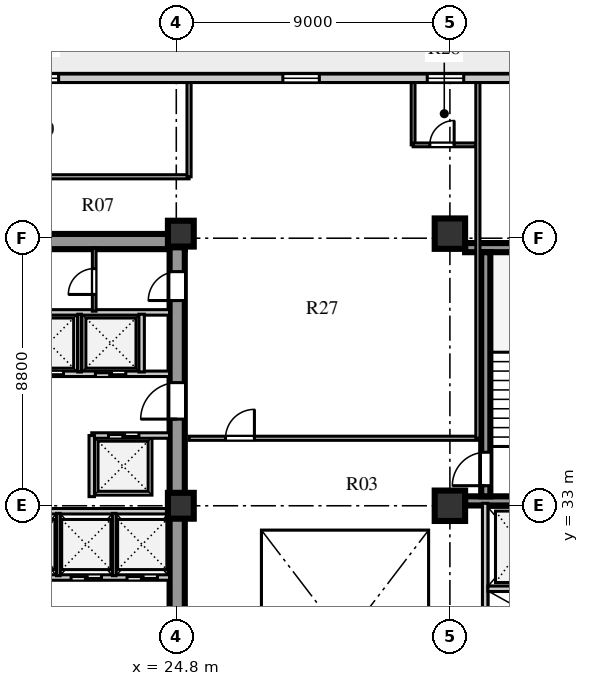
"""IFC4 building model, lengths in metres.
Left out: names, types, materials, properties, quantities, classifications, styles, units other than length and angle.
Written with IfcOpenShell. Run it as: python <this file> out.ifc"""

import sys

from ifc_helpers import new_model, si_unit, direction, frame, frame_2d, origin, origin_2d, place, context, subcontext, project, spatial, rectangle, extrude, element, fill, save


model = new_model("IFC4")
c1 = context("Model", 3, precision=1e-05, world=origin(), true_north=direction((0.0, 1.0)))
c2 = subcontext(c1, "Body", "Model", "MODEL_VIEW")
j1 = project(units=[si_unit("LENGTHUNIT", "METRE"), si_unit("PLANEANGLEUNIT", "RADIAN")], contexts=[c1])
p1 = place(None, origin())
s1 = spatial("IfcSite", under=j1, at=p1, CompositionType="ELEMENT")
p2 = place(p1, origin())
s2 = spatial("IfcBuilding", under=s1, at=p2, CompositionType="ELEMENT")
p3 = place(p2, frame((0.0, 0.0, 119.4)))
s3 = spatial("IfcBuildingStorey", under=s2, at=p3, CompositionType="ELEMENT", Elevation=119.4)
p4 = place(p3, frame((15.4, 41.69, 0.0), z_axis=(0.0, 0.0, 1.0), x_axis=(1.0, 0.0, 0.0)))
e1 = element("IfcWall", 1, at=p4, inside=s3, PredefinedType="SHEAR", context=c2, shape_type="SweptSolid", body=[
    extrude(rectangle(XDim=9.68, YDim=0.5, at=frame_2d((4.84, 0.0))), origin(), (0.0, 0.0, 1.0), 3.6),
])
p5 = place(p3, frame((24.83, 15.74, 0.0), z_axis=(0.0, 0.0, 1.0), x_axis=(0.0, 1.0, 0.0)))
e2 = element("IfcWall", 2, at=p5, inside=s3, PredefinedType="SHEAR", context=c2, shape_type="SweptSolid", body=[
    extrude(rectangle(XDim=25.76, YDim=0.5, at=frame_2d((12.88, 0.0))), origin(), (0.0, 0.0, 1.0), 3.6),
])
p6 = place(p5, frame((1.61, 0.0, 0.0)))
e3 = element("IfcOpeningElement", 3, at=p6, cuts=e2, PredefinedType="OPENING", context=c2, shape_type="SweptSolid", body=[
    extrude(rectangle(XDim=1.2, YDim=2.1, at=frame_2d((0.6, 1.05))), frame((0.0, 0.26, 0.0), z_axis=(0.0, -1.0, 0.0), x_axis=(1.0, 0.0, 0.0)), (0.0, 0.0, 1.0), 0.52),
])
p7 = place(p5, frame((6.78, 0.0, 0.0)))
e4 = element("IfcOpeningElement", 4, at=p7, cuts=e2, PredefinedType="OPENING", context=c2, shape_type="SweptSolid", body=[
    extrude(rectangle(XDim=0.85, YDim=2.06, at=frame_2d((0.425, 1.03))), frame((0.0, 0.26, 0.0), z_axis=(0.0, -1.0, 0.0), x_axis=(1.0, 0.0, 0.0)), (0.0, 0.0, 1.0), 0.52),
])
p8 = place(p5, frame((12.11, 0.0, 0.0)))
e5 = element("IfcOpeningElement", 5, at=p8, cuts=e2, PredefinedType="OPENING", context=c2, shape_type="SweptSolid", body=[
    extrude(rectangle(XDim=1.5, YDim=2.12, at=frame_2d((0.75, 1.06))), frame((0.0, 0.26, 0.0), z_axis=(0.0, -1.0, 0.0), x_axis=(1.0, 0.0, 0.0)), (0.0, 0.0, 1.0), 0.52),
])
p9 = place(p5, frame((20.11, 0.0, 0.0)))
e6 = element("IfcOpeningElement", 6, at=p9, cuts=e2, PredefinedType="OPENING", context=c2, shape_type="SweptSolid", body=[
    extrude(rectangle(XDim=1.2, YDim=2.12, at=frame_2d((0.6, 1.06))), frame((0.0, 0.26, 0.0), z_axis=(0.0, -1.0, 0.0), x_axis=(1.0, 0.0, 0.0)), (0.0, 0.0, 1.0), 0.52),
])
p10 = place(p5, frame((24.01, 0.0, 0.0)))
e7 = element("IfcOpeningElement", 7, at=p10, cuts=e2, PredefinedType="OPENING", context=c2, shape_type="SweptSolid", body=[
    extrude(rectangle(XDim=0.95, YDim=2.1, at=frame_2d((0.475, 1.05))), frame((0.0, 0.26, 0.0), z_axis=(0.0, -1.0, 0.0), x_axis=(1.0, 0.0, 0.0)), (0.0, 0.0, 1.0), 0.52),
])
for number, where, z_axis, x_axis in (
    (8, (34.3, 33.16, 0.0), (0.0, 0.0, 1.0), (1.0, 0.0, 0.0)),
    (9, (34.3, 41.49, 0.0), (0.0, 0.0, 1.0), (1.0, 0.0, 0.0)),
):
    element("IfcWall", number, at=place(p3, frame(where, z_axis=z_axis, x_axis=x_axis)), inside=s3, PredefinedType="SHEAR", context=c2, shape_type="SweptSolid", body=[
        extrude(rectangle(XDim=4.57, YDim=0.3, at=frame_2d((2.285, 0.0))), origin(), (0.0, 0.0, 1.0), 3.6),
    ])
p11 = place(p3, frame((34.98, 33.31, 0.0), z_axis=(0.0, 0.0, 1.0), x_axis=(0.0, 1.0, 0.0)))
e10 = element("IfcWall", 10, at=p11, inside=s3, PredefinedType="SHEAR", context=c2, shape_type="SweptSolid", body=[
    extrude(rectangle(XDim=8.03, YDim=0.3, at=frame_2d((4.015, 0.0))), origin(), (0.0, 0.0, 1.0), 3.6),
])
p12 = place(p11, frame((0.35, 0.0, 0.0)))
e11 = element("IfcOpeningElement", 11, at=p12, cuts=e10, PredefinedType="OPENING", context=c2, shape_type="SweptSolid", body=[
    extrude(rectangle(XDim=1.1, YDim=2.1, at=frame_2d((0.55, 1.05))), frame((0.0, 0.16, 0.0), z_axis=(0.0, -1.0, 0.0), x_axis=(1.0, 0.0, 0.0)), (0.0, 0.0, 1.0), 0.32),
])
for number, where, z_axis, x_axis in (
    (12, (24.95, 33.0, 0.0), (0.0, 0.0, 1.0), (1.0, 0.0, 0.0)),
    (13, (24.95, 41.95, 0.0), (0.0, 0.0, 1.0), (1.0, 0.0, 0.0)),
):
    element("IfcColumn", number, at=place(p3, frame(where, z_axis=z_axis, x_axis=x_axis)), inside=s3, PredefinedType="COLUMN", context=c2, shape_type="SweptSolid", body=[
        extrude(rectangle(XDim=0.85, YDim=0.85, at=origin_2d()), origin(), (0.0, 0.0, 1.0), 3.6),
    ])
for number, where, z_axis, x_axis in (
    (14, (33.8, 33.0, 0.0), (0.0, 0.0, 1.0), (1.0, 0.0, 0.0)),
    (15, (33.8, 41.95, 0.0), (0.0, 0.0, 1.0), (1.0, 0.0, 0.0)),
):
    element("IfcColumn", number, at=place(p3, frame(where, z_axis=z_axis, x_axis=x_axis)), inside=s3, PredefinedType="COLUMN", context=c2, shape_type="SweptSolid", body=[
        extrude(rectangle(XDim=1.0, YDim=1.0, at=origin_2d()), origin(), (0.0, 0.0, 1.0), 3.6),
    ])
p13 = place(p3, frame((45.35, 47.06, 0.0), z_axis=(0.0, 0.0, 1.0), x_axis=(-1.0, 0.0, 0.0)))
e16 = element("IfcWall", 16, at=p13, inside=s3, PredefinedType="STANDARD", context=c2, shape_type="SweptSolid", body=[
    extrude(rectangle(XDim=32.1, YDim=0.28, at=frame_2d((16.05, 0.0))), origin(), (0.0, 0.0, 1.0), 3.6),
])
p14 = place(p13, frame((30.15, 0.0, 0.0)))
e17 = element("IfcOpeningElement", 17, at=p14, cuts=e16, PredefinedType="OPENING", context=c2, shape_type="SweptSolid", body=[
    extrude(rectangle(XDim=1.0, YDim=2.05, at=frame_2d((0.5, 1.025))), frame((0.0, 0.15, 0.0), z_axis=(0.0, -1.0, 0.0), x_axis=(1.0, 0.0, 0.0)), (0.0, 0.0, 1.0), 0.3),
])
p15 = place(p13, frame((24.42, 0.0, 0.8)))
e18 = element("IfcOpeningElement", 18, at=p15, cuts=e16, PredefinedType="OPENING", context=c2, shape_type="SweptSolid", body=[
    extrude(rectangle(XDim=1.5, YDim=2.0, at=frame_2d((0.75, 1.0))), frame((0.0, 0.15, 0.0), z_axis=(0.0, -1.0, 0.0), x_axis=(1.0, 0.0, 0.0)), (0.0, 0.0, 1.0), 0.3),
])
p16 = place(p13, frame((15.845, 0.0, 0.8)))
e19 = element("IfcOpeningElement", 19, at=p16, cuts=e16, PredefinedType="OPENING", context=c2, shape_type="SweptSolid", body=[
    extrude(rectangle(XDim=1.2, YDim=1.75, at=frame_2d((0.6, 0.875))), frame((0.0, 0.15, 0.0), z_axis=(0.0, -1.0, 0.0), x_axis=(1.0, 0.0, 0.0)), (0.0, 0.0, 1.0), 0.3),
])
p17 = place(p13, frame((11.095, 0.0, 0.8)))
e20 = element("IfcOpeningElement", 20, at=p17, cuts=e16, PredefinedType="OPENING", context=c2, shape_type="SweptSolid", body=[
    extrude(rectangle(XDim=1.2, YDim=1.75, at=frame_2d((0.6, 0.875))), frame((0.0, 0.15, 0.0), z_axis=(0.0, -1.0, 0.0), x_axis=(1.0, 0.0, 0.0)), (0.0, 0.0, 1.0), 0.3),
])
p18 = place(p13, frame((6.53, 0.0, 0.8)))
e21 = element("IfcOpeningElement", 21, at=p18, cuts=e16, PredefinedType="OPENING", context=c2, shape_type="SweptSolid", body=[
    extrude(rectangle(XDim=2.1, YDim=1.95, at=frame_2d((1.05, 0.975))), frame((0.0, 0.15, 0.0), z_axis=(0.0, -1.0, 0.0), x_axis=(1.0, 0.0, 0.0)), (0.0, 0.0, 1.0), 0.3),
])
p19 = place(p13, frame((1.645, 0.0, 0.8)))
e22 = element("IfcOpeningElement", 22, at=p19, cuts=e16, PredefinedType="OPENING", context=c2, shape_type="SweptSolid", body=[
    extrude(rectangle(XDim=1.35, YDim=1.9, at=frame_2d((0.675, 0.95))), frame((0.0, 0.15, 0.0), z_axis=(0.0, -1.0, 0.0), x_axis=(1.0, 0.0, 0.0)), (0.0, 0.0, 1.0), 0.3),
])
p20 = place(p3, frame((15.9, 30.64, 0.0), z_axis=(0.0, 0.0, 1.0), x_axis=(1.0, 0.0, 0.0)))
e23 = element("IfcWall", 23, at=p20, inside=s3, PredefinedType="SOLIDWALL", context=c2, shape_type="SweptSolid", body=[
    extrude(rectangle(XDim=8.68, YDim=0.18, at=frame_2d((4.34, 0.0))), origin(), (0.0, 0.0, 1.0), 3.6),
])
p21 = place(p20, frame((1.76, 0.0, 0.0)))
e24 = element("IfcOpeningElement", 24, at=p21, cuts=e23, PredefinedType="OPENING", context=c2, shape_type="SweptSolid", body=[
    extrude(rectangle(XDim=1.0, YDim=2.1, at=frame_2d((0.5, 1.05))), frame((0.0, 0.1, 0.0), z_axis=(0.0, -1.0, 0.0), x_axis=(1.0, 0.0, 0.0)), (0.0, 0.0, 1.0), 0.2),
])
p22 = place(p20, frame((3.6, 0.0, 0.0)))
e25 = element("IfcOpeningElement", 25, at=p22, cuts=e23, PredefinedType="OPENING", context=c2, shape_type="SweptSolid", body=[
    extrude(rectangle(XDim=1.0, YDim=2.1, at=frame_2d((0.5, 1.05))), frame((0.0, 0.1, 0.0), z_axis=(0.0, -1.0, 0.0), x_axis=(1.0, 0.0, 0.0)), (0.0, 0.0, 1.0), 0.2),
])
p23 = place(p20, frame((5.44, 0.0, 0.0)))
e26 = element("IfcOpeningElement", 26, at=p23, cuts=e23, PredefinedType="OPENING", context=c2, shape_type="SweptSolid", body=[
    extrude(rectangle(XDim=1.0, YDim=2.1, at=frame_2d((0.5, 1.05))), frame((0.0, 0.1, 0.0), z_axis=(0.0, -1.0, 0.0), x_axis=(1.0, 0.0, 0.0)), (0.0, 0.0, 1.0), 0.2),
])
p24 = place(p20, frame((7.28, 0.0, 0.0)))
e27 = element("IfcOpeningElement", 27, at=p24, cuts=e23, PredefinedType="OPENING", context=c2, shape_type="SweptSolid", body=[
    extrude(rectangle(XDim=1.0, YDim=2.1, at=frame_2d((0.5, 1.05))), frame((0.0, 0.1, 0.0), z_axis=(0.0, -1.0, 0.0), x_axis=(1.0, 0.0, 0.0)), (0.0, 0.0, 1.0), 0.2),
])
p25 = place(p3, frame((15.9, 32.82, 0.0), z_axis=(0.0, 0.0, 1.0), x_axis=(1.0, 0.0, 0.0)))
e28 = element("IfcWall", 28, at=p25, inside=s3, PredefinedType="SOLIDWALL", context=c2, shape_type="SweptSolid", body=[
    extrude(rectangle(XDim=8.68, YDim=0.18, at=frame_2d((4.34, 0.0))), origin(), (0.0, 0.0, 1.0), 2.95),
])
for number, where, z_axis, x_axis in (
    (29, (20.92, 30.7, 0.0), (0.0, 0.0, 1.0), (0.0, 1.0, 0.0)),
    (30, (22.76, 30.7, 0.0), (0.0, 0.0, 1.0), (0.0, 1.0, 0.0)),
):
    element("IfcWall", number, at=place(p3, frame(where, z_axis=z_axis, x_axis=x_axis)), inside=s3, PredefinedType="PARTITIONING", context=c2, shape_type="SweptSolid", body=[
        extrude(rectangle(XDim=2.05, YDim=0.12, at=frame_2d((1.025, 0.0))), origin(), (0.0, 0.0, 1.0), 3.6),
    ])
p26 = place(p3, frame((22.02, 35.31, 0.0), z_axis=(0.0, 0.0, 1.0), x_axis=(1.0, 0.0, 0.0)))
e31 = element("IfcWall", 31, at=p26, inside=s3, PredefinedType="SOLIDWALL", context=c2, shape_type="SweptSolid", body=[
    extrude(rectangle(XDim=2.56, YDim=0.18, at=frame_2d((1.28, 0.0))), origin(), (0.0, 0.0, 1.0), 3.6),
])
p27 = place(p26, frame((0.55, 0.0, 0.0)))
e32 = element("IfcOpeningElement", 32, at=p27, cuts=e31, PredefinedType="OPENING", context=c2, shape_type="SweptSolid", body=[
    extrude(rectangle(XDim=1.0, YDim=2.1, at=frame_2d((0.5, 1.05))), frame((0.0, 0.1, 0.0), z_axis=(0.0, -1.0, 0.0), x_axis=(1.0, 0.0, 0.0)), (0.0, 0.0, 1.0), 0.2),
])
p28 = place(p3, frame((22.02, 33.3, 0.0), z_axis=(0.0, 0.0, 1.0), x_axis=(0.0, 1.0, 0.0)))
e33 = element("IfcWall", 33, at=p28, inside=s3, PredefinedType="SOLIDWALL", context=c2, shape_type="SweptSolid", body=[
    extrude(rectangle(XDim=2.01, YDim=0.18, at=frame_2d((1.005, 0.0))), origin(), (0.0, 0.0, 1.0), 3.6),
])
p29 = place(p3, frame((19.64, 37.34, 0.0), z_axis=(0.0, 0.0, 1.0), x_axis=(1.0, 0.0, 0.0)))
e34 = element("IfcWall", 34, at=p29, inside=s3, PredefinedType="SOLIDWALL", context=c2, shape_type="SweptSolid", body=[
    extrude(rectangle(XDim=4.94, YDim=0.18, at=frame_2d((2.47, 0.0))), origin(), (0.0, 0.0, 1.0), 3.6),
])
p30 = place(p29, frame((0.45, 0.0, 0.0)))
e35 = element("IfcOpeningElement", 35, at=p30, cuts=e34, PredefinedType="OPENING", context=c2, shape_type="SweptSolid", body=[
    extrude(rectangle(XDim=1.0, YDim=2.1, at=frame_2d((0.5, 1.05))), frame((0.0, 0.1, 0.0), z_axis=(0.0, -1.0, 0.0), x_axis=(1.0, 0.0, 0.0)), (0.0, 0.0, 1.0), 0.2),
])
p31 = place(p29, frame((2.5, 0.0, 0.0)))
e36 = element("IfcOpeningElement", 36, at=p31, cuts=e34, PredefinedType="OPENING", context=c2, shape_type="SweptSolid", body=[
    extrude(rectangle(XDim=1.0, YDim=2.1, at=frame_2d((0.5, 1.05))), frame((0.0, 0.1, 0.0), z_axis=(0.0, -1.0, 0.0), x_axis=(1.0, 0.0, 0.0)), (0.0, 0.0, 1.0), 0.2),
])
p32 = place(p3, frame((19.64, 39.36, 0.0), z_axis=(0.0, 0.0, 1.0), x_axis=(1.0, 0.0, 0.0)))
e37 = element("IfcWall", 37, at=p32, inside=s3, PredefinedType="SOLIDWALL", context=c2, shape_type="SweptSolid", body=[
    extrude(rectangle(XDim=4.94, YDim=0.18, at=frame_2d((2.47, 0.0))), origin(), (0.0, 0.0, 1.0), 3.6),
])
p33 = place(p3, frame((21.62, 37.4, 0.0), z_axis=(0.0, 0.0, 1.0), x_axis=(0.0, 1.0, 0.0)))
e38 = element("IfcWall", 38, at=p33, inside=s3, PredefinedType="PARTITIONING", context=c2, shape_type="SweptSolid", body=[
    extrude(rectangle(XDim=1.9, YDim=0.12, at=frame_2d((0.95, 0.0))), origin(), (0.0, 0.0, 1.0), 3.6),
])
p34 = place(p3, frame((23.66, 37.4, 0.0), z_axis=(0.0, 0.0, 1.0), x_axis=(0.0, 1.0, 0.0)))
e39 = element("IfcWall", 39, at=p34, inside=s3, PredefinedType="SOLIDWALL", context=c2, shape_type="SweptSolid", body=[
    extrude(rectangle(XDim=1.9, YDim=0.18, at=frame_2d((0.95, 0.0))), origin(), (0.0, 0.0, 1.0), 3.6),
])
p35 = place(p3, frame((22.1, 39.4, 0.0), z_axis=(0.0, 0.0, 1.0), x_axis=(0.0, 1.0, 0.0)))
e40 = element("IfcWall", 40, at=p35, inside=s3, PredefinedType="PARTITIONING", context=c2, shape_type="SweptSolid", body=[
    extrude(rectangle(XDim=2.08, YDim=0.12, at=frame_2d((1.04, 0.0))), origin(), (0.0, 0.0, 1.0), 3.6),
])
p36 = place(p35, frame((0.55, 0.0, 0.0)))
e41 = element("IfcOpeningElement", 41, at=p36, cuts=e40, PredefinedType="OPENING", context=c2, shape_type="SweptSolid", body=[
    extrude(rectangle(XDim=0.85, YDim=2.06, at=frame_2d((0.425, 1.03))), frame((0.0, 0.07, 0.0), z_axis=(0.0, -1.0, 0.0), x_axis=(1.0, 0.0, 0.0)), (0.0, 0.0, 1.0), 0.14),
])
p37 = place(p3, frame((34.96, 28.86, 0.0), z_axis=(0.0, 0.0, 1.0), x_axis=(0.0, 1.0, 0.0)))
e42 = element("IfcWall", 42, at=p37, inside=s3, PredefinedType="SOLIDWALL", context=c2, shape_type="SweptSolid", body=[
    extrude(rectangle(XDim=4.22, YDim=0.18, at=frame_2d((2.11, 0.0))), origin(), (0.0, 0.0, 1.0), 3.6),
])
p38 = place(p3, frame((35.05, 30.27, 0.0), z_axis=(0.0, 0.0, 1.0), x_axis=(1.0, 0.0, 0.0)))
e43 = element("IfcWall", 43, at=p38, inside=s3, PredefinedType="SOLIDWALL", context=c2, shape_type="SweptSolid", body=[
    extrude(rectangle(XDim=2.25, YDim=0.18, at=frame_2d((1.125, 0.0))), origin(), (0.0, 0.0, 1.0), 3.6),
])
p39 = place(p3, frame((25.22, 35.22, 0.0), z_axis=(0.0, 0.0, 1.0), x_axis=(1.0, 0.0, 0.0)))
e44 = element("IfcWall", 44, at=p39, inside=s3, PredefinedType="PARTITIONING", context=c2, shape_type="SweptSolid", body=[
    extrude(rectangle(XDim=9.5, YDim=0.135, at=frame_2d((4.75, 0.0))), origin(), (0.0, 0.0, 1.0), 3.6),
])
p40 = place(p39, frame((1.2, 0.0, 0.0)))
e45 = element("IfcOpeningElement", 45, at=p40, cuts=e44, PredefinedType="OPENING", context=c2, shape_type="SweptSolid", body=[
    extrude(rectangle(XDim=0.95, YDim=2.1, at=frame_2d((0.475, 1.05))), frame((0.0, 0.078, 0.0), z_axis=(0.0, -1.0, 0.0), x_axis=(1.0, 0.0, 0.0)), (0.0, 0.0, 1.0), 0.155),
])
p41 = place(p3, frame((13.59, 43.82, 0.0), z_axis=(0.0, 0.0, 1.0), x_axis=(1.0, 0.0, 0.0)))
e46 = element("IfcWall", 46, at=p41, inside=s3, PredefinedType="PARTITIONING", context=c2, shape_type="SweptSolid", body=[
    extrude(rectangle(XDim=11.63, YDim=0.135, at=frame_2d((5.815, 0.0))), origin(), (0.0, 0.0, 1.0), 3.6),
])
p42 = place(p41, frame((4.56, 0.0, 0.0)))
e47 = element("IfcOpeningElement", 47, at=p42, cuts=e46, PredefinedType="OPENING", context=c2, shape_type="SweptSolid", body=[
    extrude(rectangle(XDim=1.0, YDim=2.08, at=frame_2d((0.5, 1.04))), frame((0.0, 0.078, 0.0), z_axis=(0.0, -1.0, 0.0), x_axis=(1.0, 0.0, 0.0)), (0.0, 0.0, 1.0), 0.155),
])
p43 = place(p3, frame((25.22, 43.82, 0.0), z_axis=(0.0, 0.0, 1.0), x_axis=(0.0, 1.0, 0.0)))
e48 = element("IfcWall", 48, at=p43, inside=s3, PredefinedType="PARTITIONING", context=c2, shape_type="SweptSolid", body=[
    extrude(rectangle(XDim=3.1, YDim=0.135, at=frame_2d((1.55, 0.0))), origin(), (0.0, 0.0, 1.0), 3.1),
])
p44 = place(p3, frame((34.72, 35.22, 0.0), z_axis=(0.0, 0.0, 1.0), x_axis=(0.0, 1.0, 0.0)))
e49 = element("IfcWall", 49, at=p44, inside=s3, PredefinedType="PARTITIONING", context=c2, shape_type="SweptSolid", body=[
    extrude(rectangle(XDim=11.7, YDim=0.135, at=frame_2d((5.85, 0.0))), origin(), (0.0, 0.0, 1.0), 3.6),
])
p45 = place(p3, frame((32.59, 44.87, 0.0), z_axis=(0.0, 0.0, 1.0), x_axis=(0.0, 1.0, 0.0)))
e50 = element("IfcWall", 50, at=p45, inside=s3, PredefinedType="PLUMBINGWALL", context=c2, shape_type="SweptSolid", body=[
    extrude(rectangle(XDim=2.05, YDim=0.125, at=frame_2d((1.025, 0.0))), origin(), (0.0, 0.0, 1.0), 3.6),
])
p46 = place(p3, frame((32.59, 44.87, 0.0), z_axis=(0.0, 0.0, 1.0), x_axis=(1.0, 0.0, 0.0)))
e51 = element("IfcWall", 51, at=p46, inside=s3, PredefinedType="PLUMBINGWALL", context=c2, shape_type="SweptSolid", body=[
    extrude(rectangle(XDim=2.05, YDim=0.125, at=frame_2d((1.025, 0.0))), origin(), (0.0, 0.0, 1.0), 3.6),
])
p47 = place(p46, frame((0.55, 0.0, 0.0)))
e52 = element("IfcOpeningElement", 52, at=p47, cuts=e51, PredefinedType="OPENING", context=c2, shape_type="SweptSolid", body=[
    extrude(rectangle(XDim=0.8, YDim=2.05, at=frame_2d((0.4, 1.025))), frame((0.0, 0.073, 0.0), z_axis=(0.0, -1.0, 0.0), x_axis=(1.0, 0.0, 0.0)), (0.0, 0.0, 1.0), 0.145),
])
p48 = place(p15, origin())
e53 = element("IfcWindow", 53, at=p48, inside=s3, PartitioningType="SINGLE_PANEL", PredefinedType="WINDOW", context=c2, shape_type="SweptSolid", body=[
    extrude(rectangle(XDim=1.5, YDim=2.0, at=frame_2d((0.75, 1.0))), frame((0.0, 0.03, 0.0), z_axis=(0.0, -1.0, 0.0), x_axis=(1.0, 0.0, 0.0)), (0.0, 0.0, 1.0), 0.06),
])
fill(e18, e53)
p49 = place(p16, origin())
e54 = element("IfcWindow", 54, at=p49, inside=s3, PartitioningType="SINGLE_PANEL", PredefinedType="WINDOW", context=c2, shape_type="SweptSolid", body=[
    extrude(rectangle(XDim=1.2, YDim=1.75, at=frame_2d((0.6, 0.875))), frame((0.0, 0.03, 0.0), z_axis=(0.0, -1.0, 0.0), x_axis=(1.0, 0.0, 0.0)), (0.0, 0.0, 1.0), 0.06),
])
fill(e19, e54)
p50 = place(p17, origin())
e55 = element("IfcWindow", 55, at=p50, inside=s3, PartitioningType="SINGLE_PANEL", PredefinedType="WINDOW", context=c2, shape_type="SweptSolid", body=[
    extrude(rectangle(XDim=1.2, YDim=1.75, at=frame_2d((0.6, 0.875))), frame((0.0, 0.03, 0.0), z_axis=(0.0, -1.0, 0.0), x_axis=(1.0, 0.0, 0.0)), (0.0, 0.0, 1.0), 0.06),
])
fill(e20, e55)
p51 = place(p23, frame((1.0, 0.0, 0.0), z_axis=(0.0, 0.0, 1.0), x_axis=(-1.0, 0.0, 0.0)))
e56 = element("IfcDoor", 56, at=p51, inside=s3, OperationType="DOUBLE_DOOR_SLIDING", PredefinedType="DOOR", context=c2, shape_type="SweptSolid", body=[
    extrude(rectangle(XDim=1.0, YDim=2.1, at=frame_2d((0.5, 1.05))), frame((0.0, 0.025, 0.0), z_axis=(0.0, -1.0, 0.0), x_axis=(1.0, 0.0, 0.0)), (0.0, 0.0, 1.0), 0.05),
])
fill(e26, e56)
p52 = place(p24, frame((1.0, 0.0, 0.0), z_axis=(0.0, 0.0, 1.0), x_axis=(-1.0, 0.0, 0.0)))
e57 = element("IfcDoor", 57, at=p52, inside=s3, OperationType="DOUBLE_DOOR_SLIDING", PredefinedType="DOOR", context=c2, shape_type="SweptSolid", body=[
    extrude(rectangle(XDim=1.0, YDim=2.1, at=frame_2d((0.5, 1.05))), frame((0.0, 0.025, 0.0), z_axis=(0.0, -1.0, 0.0), x_axis=(1.0, 0.0, 0.0)), (0.0, 0.0, 1.0), 0.05),
])
fill(e27, e57)
p53 = place(p9, frame((1.2, 0.0, 0.0), z_axis=(0.0, 0.0, 1.0), x_axis=(-1.0, 0.0, 0.0)))
e58 = element("IfcDoor", 58, at=p53, inside=s3, OperationType="SINGLE_SWING_RIGHT", PredefinedType="DOOR", context=c2, shape_type="SweptSolid", body=[
    extrude(rectangle(XDim=1.2, YDim=2.12, at=frame_2d((0.6, 1.06))), frame((0.0, 0.025, 0.0), z_axis=(0.0, -1.0, 0.0), x_axis=(1.0, 0.0, 0.0)), (0.0, 0.0, 1.0), 0.05),
])
fill(e6, e58)
p54 = place(p30, frame((1.0, 0.0, 0.0), z_axis=(0.0, 0.0, 1.0), x_axis=(-1.0, 0.0, 0.0)))
e59 = element("IfcDoor", 59, at=p54, inside=s3, OperationType="DOUBLE_DOOR_SLIDING", PredefinedType="DOOR", context=c2, shape_type="SweptSolid", body=[
    extrude(rectangle(XDim=1.0, YDim=2.1, at=frame_2d((0.5, 1.05))), frame((0.0, 0.025, 0.0), z_axis=(0.0, -1.0, 0.0), x_axis=(1.0, 0.0, 0.0)), (0.0, 0.0, 1.0), 0.05),
])
fill(e35, e59)
p55 = place(p31, frame((1.0, 0.0, 0.0), z_axis=(0.0, 0.0, 1.0), x_axis=(-1.0, 0.0, 0.0)))
e60 = element("IfcDoor", 60, at=p55, inside=s3, OperationType="DOUBLE_DOOR_SLIDING", PredefinedType="DOOR", context=c2, shape_type="SweptSolid", body=[
    extrude(rectangle(XDim=1.0, YDim=2.1, at=frame_2d((0.5, 1.05))), frame((0.0, 0.025, 0.0), z_axis=(0.0, -1.0, 0.0), x_axis=(1.0, 0.0, 0.0)), (0.0, 0.0, 1.0), 0.05),
])
fill(e36, e60)
p56 = place(p27, origin())
e61 = element("IfcDoor", 61, at=p56, inside=s3, OperationType="DOUBLE_DOOR_SLIDING", PredefinedType="DOOR", context=c2, shape_type="SweptSolid", body=[
    extrude(rectangle(XDim=1.0, YDim=2.1, at=frame_2d((0.5, 1.05))), frame((0.0, 0.025, 0.0), z_axis=(0.0, -1.0, 0.0), x_axis=(1.0, 0.0, 0.0)), (0.0, 0.0, 1.0), 0.05),
])
fill(e32, e61)
p57 = place(p36, origin())
e62 = element("IfcDoor", 62, at=p57, inside=s3, OperationType="SINGLE_SWING_LEFT", PredefinedType="DOOR", context=c2, shape_type="SweptSolid", body=[
    extrude(rectangle(XDim=0.85, YDim=2.06, at=frame_2d((0.425, 1.03))), frame((0.0, 0.025, 0.0), z_axis=(0.0, -1.0, 0.0), x_axis=(1.0, 0.0, 0.0)), (0.0, 0.0, 1.0), 0.05),
])
fill(e41, e62)
p58 = place(p10, frame((0.95, 0.0, 0.0), z_axis=(0.0, 0.0, 1.0), x_axis=(-1.0, 0.0, 0.0)))
e63 = element("IfcDoor", 63, at=p58, inside=s3, OperationType="SINGLE_SWING_RIGHT", PredefinedType="DOOR", context=c2, shape_type="SweptSolid", body=[
    extrude(rectangle(XDim=0.95, YDim=2.1, at=frame_2d((0.475, 1.05))), frame((0.0, 0.025, 0.0), z_axis=(0.0, -1.0, 0.0), x_axis=(1.0, 0.0, 0.0)), (0.0, 0.0, 1.0), 0.05),
])
fill(e7, e63)
p59 = place(p12, origin())
e64 = element("IfcDoor", 64, at=p59, inside=s3, OperationType="SINGLE_SWING_LEFT", PredefinedType="DOOR", context=c2, shape_type="SweptSolid", body=[
    extrude(rectangle(XDim=1.1, YDim=2.1, at=frame_2d((0.55, 1.05))), frame((0.0, 0.025, 0.0), z_axis=(0.0, -1.0, 0.0), x_axis=(1.0, 0.0, 0.0)), (0.0, 0.0, 1.0), 0.05),
])
fill(e11, e64)
p60 = place(p40, origin())
e65 = element("IfcDoor", 65, at=p60, inside=s3, OperationType="SINGLE_SWING_RIGHT", PredefinedType="DOOR", context=c2, shape_type="SweptSolid", body=[
    extrude(rectangle(XDim=0.95, YDim=2.1, at=frame_2d((0.475, 1.05))), frame((0.0, 0.025, 0.0), z_axis=(0.0, -1.0, 0.0), x_axis=(1.0, 0.0, 0.0)), (0.0, 0.0, 1.0), 0.05),
])
fill(e45, e65)
p61 = place(p47, frame((0.8, 0.0, 0.0), z_axis=(0.0, 0.0, 1.0), x_axis=(-1.0, 0.0, 0.0)))
e66 = element("IfcDoor", 66, at=p61, inside=s3, OperationType="SINGLE_SWING_LEFT", PredefinedType="DOOR", context=c2, shape_type="SweptSolid", body=[
    extrude(rectangle(XDim=0.8, YDim=2.05, at=frame_2d((0.4, 1.025))), frame((0.0, 0.025, 0.0), z_axis=(0.0, -1.0, 0.0), x_axis=(1.0, 0.0, 0.0)), (0.0, 0.0, 1.0), 0.05),
])
fill(e52, e66)
save(model, sys.argv[1])
